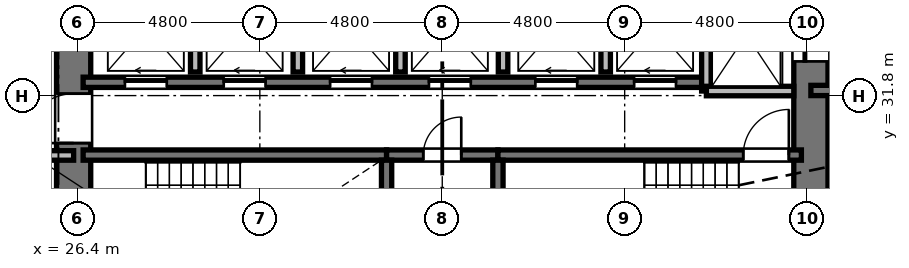
"""IFC4 building model, lengths in metres.
Left out: names, types, materials, properties, quantities, classifications, styles, units other than length and angle.
Written with IfcOpenShell. Run it as: python <this file> out.ifc"""

import sys

from ifc_helpers import new_model, si_unit, direction, frame, frame_2d, origin, place, context, subcontext, project, spatial, rectangle, extrude, element, fill, save


model = new_model("IFC4")
c1 = context("Model", 3, precision=1e-05, world=origin(), true_north=direction((0.0, 1.0)))
c2 = subcontext(c1, "Body", "Model", "MODEL_VIEW")
j1 = project(units=[si_unit("LENGTHUNIT", "METRE"), si_unit("PLANEANGLEUNIT", "RADIAN")], contexts=[c1])
p1 = place(None, origin())
s1 = spatial("IfcSite", under=j1, at=p1, CompositionType="ELEMENT")
p2 = place(p1, origin())
s2 = spatial("IfcBuilding", under=s1, at=p2, CompositionType="ELEMENT")
p3 = place(p2, origin())
s3 = spatial("IfcBuildingStorey", under=s2, at=p3, CompositionType="ELEMENT", Elevation=0.0)
p4 = place(p3, frame((26.3, 20.95, 0.0), z_axis=(0.0, 0.0, 1.0), x_axis=(0.0, 1.0, 0.0)))
e1 = element("IfcWall", 1, at=p4, inside=s3, PredefinedType="SHEAR", context=c2, shape_type="SweptSolid", body=[
    extrude(rectangle(XDim=14.1, YDim=0.9, at=frame_2d((7.05, 0.0))), origin(), (0.0, 0.0, 1.0), 6.0),
])
p5 = place(p4, frame((6.5, 0.0, 0.0)))
e2 = element("IfcOpeningElement", 2, at=p5, cuts=e1, PredefinedType="OPENING", context=c2, shape_type="SweptSolid", body=[
    extrude(rectangle(XDim=1.2, YDim=2.15, at=frame_2d((0.6, 1.075))), frame((0.0, 0.46, 0.0), z_axis=(0.0, -1.0, 0.0), x_axis=(1.0, 0.0, 0.0)), (0.0, 0.0, 1.0), 0.92),
])
p6 = place(p4, frame((9.6, 0.0, 0.0)))
e3 = element("IfcOpeningElement", 3, at=p6, cuts=e1, PredefinedType="OPENING", context=c2, shape_type="SweptSolid", body=[
    extrude(rectangle(XDim=1.3, YDim=2.2, at=frame_2d((0.65, 1.1))), frame((0.0, 0.46, 0.0), z_axis=(0.0, -1.0, 0.0), x_axis=(1.0, 0.0, 0.0)), (0.0, 0.0, 1.0), 0.92),
])
p7 = place(p4, frame((3.26, 0.0, 0.0)))
e4 = element("IfcOpeningElement", 4, at=p7, cuts=e1, PredefinedType="OPENING", context=c2, shape_type="SweptSolid", body=[
    extrude(rectangle(XDim=1.3, YDim=2.2, at=frame_2d((0.65, 1.1))), frame((0.0, 0.46, 0.0), z_axis=(0.0, -1.0, 0.0), x_axis=(1.0, 0.0, 0.0)), (0.0, 0.0, 1.0), 0.92),
])
p8 = place(p3, frame((45.7, 20.95, 0.0), z_axis=(0.0, 0.0, 1.0), x_axis=(0.0, 1.0, 0.0)))
e5 = element("IfcWall", 5, at=p8, inside=s3, PredefinedType="SHEAR", context=c2, shape_type="SweptSolid", body=[
    extrude(rectangle(XDim=14.1, YDim=0.9, at=frame_2d((7.05, 0.0))), origin(), (0.0, 0.0, 1.0), 6.0),
])
p9 = place(p8, frame((11.75, 0.0, 0.0)))
e6 = element("IfcOpeningElement", 6, at=p9, cuts=e5, PredefinedType="OPENING", context=c2, shape_type="SweptSolid", body=[
    extrude(rectangle(XDim=1.4, YDim=2.3, at=frame_2d((0.7, 1.15))), frame((0.0, 0.46, 0.0), z_axis=(0.0, -1.0, 0.0), x_axis=(1.0, 0.0, 0.0)), (0.0, 0.0, 1.0), 0.92),
])
p10 = place(p8, frame((0.95, 0.0, 0.0)))
e7 = element("IfcOpeningElement", 7, at=p10, cuts=e5, PredefinedType="OPENING", context=c2, shape_type="SweptSolid", body=[
    extrude(rectangle(XDim=1.4, YDim=2.3, at=frame_2d((0.7, 1.15))), frame((0.0, 0.46, 0.0), z_axis=(0.0, -1.0, 0.0), x_axis=(1.0, 0.0, 0.0)), (0.0, 0.0, 1.0), 0.92),
])
p11 = place(p3, frame((26.55, 30.235, 0.0), z_axis=(0.0, 0.0, 1.0), x_axis=(1.0, 0.0, 0.0)))
e8 = element("IfcWall", 8, at=p11, inside=s3, PredefinedType="SHEAR", context=c2, shape_type="SweptSolid", body=[
    extrude(rectangle(XDim=7.985, YDim=0.27, at=frame_2d((3.992, 0.0))), origin(), (0.0, 0.0, 1.0), 6.0),
])
p12 = place(p3, frame((34.535, 30.235, 0.0), z_axis=(0.0, 0.0, 1.0), x_axis=(1.0, 0.0, 0.0)))
e9 = element("IfcWall", 9, at=p12, inside=s3, PredefinedType="SHEAR", context=c2, shape_type="SweptSolid", body=[
    extrude(rectangle(XDim=2.93, YDim=0.27, at=frame_2d((1.465, 0.0))), origin(), (0.0, 0.0, 1.0), 6.0),
])
p13 = place(p12, frame((0.965, 0.0, 0.0)))
e10 = element("IfcOpeningElement", 10, at=p13, cuts=e9, PredefinedType="OPENING", context=c2, shape_type="SweptSolid", body=[
    extrude(rectangle(XDim=1.0, YDim=2.1, at=frame_2d((0.5, 1.05))), frame((0.0, 0.145, 0.0), z_axis=(0.0, -1.0, 0.0), x_axis=(1.0, 0.0, 0.0)), (0.0, 0.0, 1.0), 0.29),
])
p14 = place(p3, frame((37.465, 30.235, 0.0), z_axis=(0.0, 0.0, 1.0), x_axis=(1.0, 0.0, 0.0)))
e11 = element("IfcWall", 11, at=p14, inside=s3, PredefinedType="SHEAR", context=c2, shape_type="SweptSolid", body=[
    extrude(rectangle(XDim=7.985, YDim=0.27, at=frame_2d((3.992, 0.0))), origin(), (0.0, 0.0, 1.0), 6.0),
])
p15 = place(p14, frame((6.455, 0.0, 0.0)))
e12 = element("IfcOpeningElement", 12, at=p15, cuts=e11, PredefinedType="OPENING", context=c2, shape_type="SweptSolid", body=[
    extrude(rectangle(XDim=1.2, YDim=2.15, at=frame_2d((0.6, 1.075))), frame((0.0, 0.145, 0.0), z_axis=(0.0, -1.0, 0.0), x_axis=(1.0, 0.0, 0.0)), (0.0, 0.0, 1.0), 0.29),
])
for number, where, z_axis, x_axis in (
    (13, (34.535, 26.02, 0.0), (0.0, 0.0, 1.0), (0.0, 1.0, 0.0)),
    (14, (37.465, 26.02, 0.0), (0.0, 0.0, 1.0), (0.0, 1.0, 0.0)),
):
    element("IfcWall", number, at=place(p3, frame(where, z_axis=z_axis, x_axis=x_axis)), inside=s3, PredefinedType="SHEAR", context=c2, shape_type="SweptSolid", body=[
        extrude(rectangle(XDim=4.08, YDim=0.27, at=frame_2d((2.04, 0.0))), origin(), (0.0, 0.0, 1.0), 6.0),
    ])
p16 = place(p3, frame((26.55, 32.15, 0.0), z_axis=(0.0, 0.0, 1.0), x_axis=(1.0, 0.0, 0.0)))
e15 = element("IfcWall", 15, at=p16, inside=s3, PredefinedType="SHEAR", context=c2, shape_type="SweptSolid", body=[
    extrude(rectangle(XDim=16.4, YDim=0.27, at=frame_2d((8.2, 0.0))), origin(), (0.0, 0.0, 1.0), 6.0),
])
p17 = place(p16, frame((1.1, 0.0, 0.0)))
e16 = element("IfcOpeningElement", 16, at=p17, cuts=e15, PredefinedType="OPENING", context=c2, shape_type="SweptSolid", body=[
    extrude(rectangle(XDim=1.1, YDim=2.2, at=frame_2d((0.55, 1.1))), frame((0.0, 0.145, 0.0), z_axis=(0.0, -1.0, 0.0), x_axis=(1.0, 0.0, 0.0)), (0.0, 0.0, 1.0), 0.29),
])
p18 = place(p16, frame((3.7, 0.0, 0.0)))
e17 = element("IfcOpeningElement", 17, at=p18, cuts=e15, PredefinedType="OPENING", context=c2, shape_type="SweptSolid", body=[
    extrude(rectangle(XDim=1.1, YDim=2.2, at=frame_2d((0.55, 1.1))), frame((0.0, 0.145, 0.0), z_axis=(0.0, -1.0, 0.0), x_axis=(1.0, 0.0, 0.0)), (0.0, 0.0, 1.0), 0.29),
])
p19 = place(p16, frame((6.5, 0.0, 0.0)))
e18 = element("IfcOpeningElement", 18, at=p19, cuts=e15, PredefinedType="OPENING", context=c2, shape_type="SweptSolid", body=[
    extrude(rectangle(XDim=1.1, YDim=2.2, at=frame_2d((0.55, 1.1))), frame((0.0, 0.145, 0.0), z_axis=(0.0, -1.0, 0.0), x_axis=(1.0, 0.0, 0.0)), (0.0, 0.0, 1.0), 0.29),
])
p20 = place(p16, frame((9.1, 0.0, 0.0)))
e19 = element("IfcOpeningElement", 19, at=p20, cuts=e15, PredefinedType="OPENING", context=c2, shape_type="SweptSolid", body=[
    extrude(rectangle(XDim=1.1, YDim=2.2, at=frame_2d((0.55, 1.1))), frame((0.0, 0.145, 0.0), z_axis=(0.0, -1.0, 0.0), x_axis=(1.0, 0.0, 0.0)), (0.0, 0.0, 1.0), 0.29),
])
p21 = place(p16, frame((11.9, 0.0, 0.0)))
e20 = element("IfcOpeningElement", 20, at=p21, cuts=e15, PredefinedType="OPENING", context=c2, shape_type="SweptSolid", body=[
    extrude(rectangle(XDim=1.1, YDim=2.2, at=frame_2d((0.55, 1.1))), frame((0.0, 0.145, 0.0), z_axis=(0.0, -1.0, 0.0), x_axis=(1.0, 0.0, 0.0)), (0.0, 0.0, 1.0), 0.29),
])
p22 = place(p16, frame((14.5, 0.0, 0.0)))
e21 = element("IfcOpeningElement", 21, at=p22, cuts=e15, PredefinedType="OPENING", context=c2, shape_type="SweptSolid", body=[
    extrude(rectangle(XDim=1.1, YDim=2.2, at=frame_2d((0.55, 1.1))), frame((0.0, 0.145, 0.0), z_axis=(0.0, -1.0, 0.0), x_axis=(1.0, 0.0, 0.0)), (0.0, 0.0, 1.0), 0.29),
])
p23 = place(p3, frame((42.95, 31.92, 0.0), z_axis=(0.0, 0.0, 1.0), x_axis=(0.0, 1.0, 0.0)))
e22 = element("IfcWall", 22, at=p23, inside=s3, PredefinedType="SOLIDWALL", context=c2, shape_type="SweptSolid", body=[
    extrude(rectangle(XDim=3.18, YDim=0.25, at=frame_2d((1.59, 0.0))), origin(), (0.0, 0.0, 1.0), 5.72),
])
p24 = place(p3, frame((42.95, 31.92, 0.0), z_axis=(0.0, 0.0, 1.0), x_axis=(1.0, 0.0, 0.0)))
e23 = element("IfcWall", 23, at=p24, inside=s3, PredefinedType="SOLIDWALL", context=c2, shape_type="SweptSolid", body=[
    extrude(rectangle(XDim=2.3, YDim=0.25, at=frame_2d((1.15, 0.0))), origin(), (0.0, 0.0, 1.0), 5.72),
])
for number, where, z_axis, x_axis in (
    (24, (29.5, 32.42, 0.0), (0.0, 0.0, 1.0), (0.0, 1.0, 0.0)),
    (25, (32.2, 32.42, 0.0), (0.0, 0.0, 1.0), (0.0, 1.0, 0.0)),
    (26, (34.9, 32.42, 0.0), (0.0, 0.0, 1.0), (0.0, 1.0, 0.0)),
    (27, (37.6, 32.42, 0.0), (0.0, 0.0, 1.0), (0.0, 1.0, 0.0)),
    (28, (40.3, 32.42, 0.0), (0.0, 0.0, 1.0), (0.0, 1.0, 0.0)),
):
    element("IfcWall", number, at=place(p3, frame(where, z_axis=z_axis, x_axis=x_axis)), inside=s3, PredefinedType="SOLIDWALL", context=c2, shape_type="SweptSolid", body=[
        extrude(rectangle(XDim=2.68, YDim=0.25, at=frame_2d((1.34, 0.0))), origin(), (0.0, 0.0, 1.0), 5.72),
    ])
p25 = place(p3, frame((45.7, 31.935, 0.0), z_axis=(0.0, 0.0, 1.0), x_axis=(1.0, 0.0, 0.0)))
e29 = element("IfcWall", 29, at=p25, inside=s3, PredefinedType="SHEAR", context=c2, shape_type="SweptSolid", body=[
    extrude(rectangle(XDim=4.715, YDim=0.27, at=frame_2d((2.357, 0.0))), origin(), (0.0, 0.0, 1.0), 6.0),
])
p26 = place(p3, frame((24.15, 30.225, 0.0), z_axis=(0.0, 0.0, 1.0), x_axis=(1.0, 0.0, 0.0)))
e30 = element("IfcWall", 30, at=p26, inside=s3, PredefinedType="SOLIDWALL", context=c2, shape_type="SweptSolid", body=[
    extrude(rectangle(XDim=2.15, YDim=0.25, at=frame_2d((1.075, 0.0))), origin(), (0.0, 0.0, 1.0), 5.72),
])
p27 = place(p15, origin())
e31 = element("IfcDoor", 31, at=p27, inside=s3, OperationType="SINGLE_SWING_RIGHT", PredefinedType="DOOR", context=c2, shape_type="SweptSolid", body=[
    extrude(rectangle(XDim=1.2, YDim=2.15, at=frame_2d((0.6, 1.075))), frame((0.0, 0.025, 0.0), z_axis=(0.0, -1.0, 0.0), x_axis=(1.0, 0.0, 0.0)), (0.0, 0.0, 1.0), 0.05),
])
fill(e12, e31)
p28 = place(p13, origin())
e32 = element("IfcDoor", 32, at=p28, inside=s3, OperationType="SINGLE_SWING_RIGHT", PredefinedType="DOOR", context=c2, shape_type="SweptSolid", body=[
    extrude(rectangle(XDim=1.0, YDim=2.1, at=frame_2d((0.5, 1.05))), frame((0.0, 0.025, 0.0), z_axis=(0.0, -1.0, 0.0), x_axis=(1.0, 0.0, 0.0)), (0.0, 0.0, 1.0), 0.05),
])
fill(e10, e32)
p29 = place(p6, origin())
e33 = element("IfcDoor", 33, at=p29, inside=s3, OperationType="SINGLE_SWING_LEFT", PredefinedType="DOOR", context=c2, shape_type="SweptSolid", body=[
    extrude(rectangle(XDim=1.3, YDim=2.2, at=frame_2d((0.65, 1.1))), frame((0.0, 0.025, 0.0), z_axis=(0.0, -1.0, 0.0), x_axis=(1.0, 0.0, 0.0)), (0.0, 0.0, 1.0), 0.05),
])
fill(e3, e33)
p30 = place(p17, origin())
e34 = element("IfcDoor", 34, at=p30, inside=s3, OperationType="SLIDING_TO_LEFT", PredefinedType="DOOR", context=c2, shape_type="SweptSolid", body=[
    extrude(rectangle(XDim=1.1, YDim=2.2, at=frame_2d((0.55, 1.1))), frame((0.0, 0.025, 0.0), z_axis=(0.0, -1.0, 0.0), x_axis=(1.0, 0.0, 0.0)), (0.0, 0.0, 1.0), 0.05),
])
fill(e16, e34)
p31 = place(p18, origin())
e35 = element("IfcDoor", 35, at=p31, inside=s3, OperationType="SLIDING_TO_LEFT", PredefinedType="DOOR", context=c2, shape_type="SweptSolid", body=[
    extrude(rectangle(XDim=1.1, YDim=2.2, at=frame_2d((0.55, 1.1))), frame((0.0, 0.025, 0.0), z_axis=(0.0, -1.0, 0.0), x_axis=(1.0, 0.0, 0.0)), (0.0, 0.0, 1.0), 0.05),
])
fill(e17, e35)
p32 = place(p19, origin())
e36 = element("IfcDoor", 36, at=p32, inside=s3, OperationType="SLIDING_TO_LEFT", PredefinedType="DOOR", context=c2, shape_type="SweptSolid", body=[
    extrude(rectangle(XDim=1.1, YDim=2.2, at=frame_2d((0.55, 1.1))), frame((0.0, 0.025, 0.0), z_axis=(0.0, -1.0, 0.0), x_axis=(1.0, 0.0, 0.0)), (0.0, 0.0, 1.0), 0.05),
])
fill(e18, e36)
p33 = place(p20, origin())
e37 = element("IfcDoor", 37, at=p33, inside=s3, OperationType="SLIDING_TO_LEFT", PredefinedType="DOOR", context=c2, shape_type="SweptSolid", body=[
    extrude(rectangle(XDim=1.1, YDim=2.2, at=frame_2d((0.55, 1.1))), frame((0.0, 0.025, 0.0), z_axis=(0.0, -1.0, 0.0), x_axis=(1.0, 0.0, 0.0)), (0.0, 0.0, 1.0), 0.05),
])
fill(e19, e37)
p34 = place(p21, origin())
e38 = element("IfcDoor", 38, at=p34, inside=s3, OperationType="SLIDING_TO_LEFT", PredefinedType="DOOR", context=c2, shape_type="SweptSolid", body=[
    extrude(rectangle(XDim=1.1, YDim=2.2, at=frame_2d((0.55, 1.1))), frame((0.0, 0.025, 0.0), z_axis=(0.0, -1.0, 0.0), x_axis=(1.0, 0.0, 0.0)), (0.0, 0.0, 1.0), 0.05),
])
fill(e20, e38)
p35 = place(p22, origin())
e39 = element("IfcDoor", 39, at=p35, inside=s3, OperationType="SLIDING_TO_LEFT", PredefinedType="DOOR", context=c2, shape_type="SweptSolid", body=[
    extrude(rectangle(XDim=1.1, YDim=2.2, at=frame_2d((0.55, 1.1))), frame((0.0, 0.025, 0.0), z_axis=(0.0, -1.0, 0.0), x_axis=(1.0, 0.0, 0.0)), (0.0, 0.0, 1.0), 0.05),
])
fill(e21, e39)
p36 = place(p9, origin())
e40 = element("IfcDoor", 40, at=p36, inside=s3, OperationType="SLIDING_TO_LEFT", PredefinedType="DOOR", context=c2, shape_type="SweptSolid", body=[
    extrude(rectangle(XDim=1.4, YDim=2.3, at=frame_2d((0.7, 1.15))), frame((0.0, 0.025, 0.0), z_axis=(0.0, -1.0, 0.0), x_axis=(1.0, 0.0, 0.0)), (0.0, 0.0, 1.0), 0.05),
])
fill(e6, e40)
save(model, sys.argv[1])
